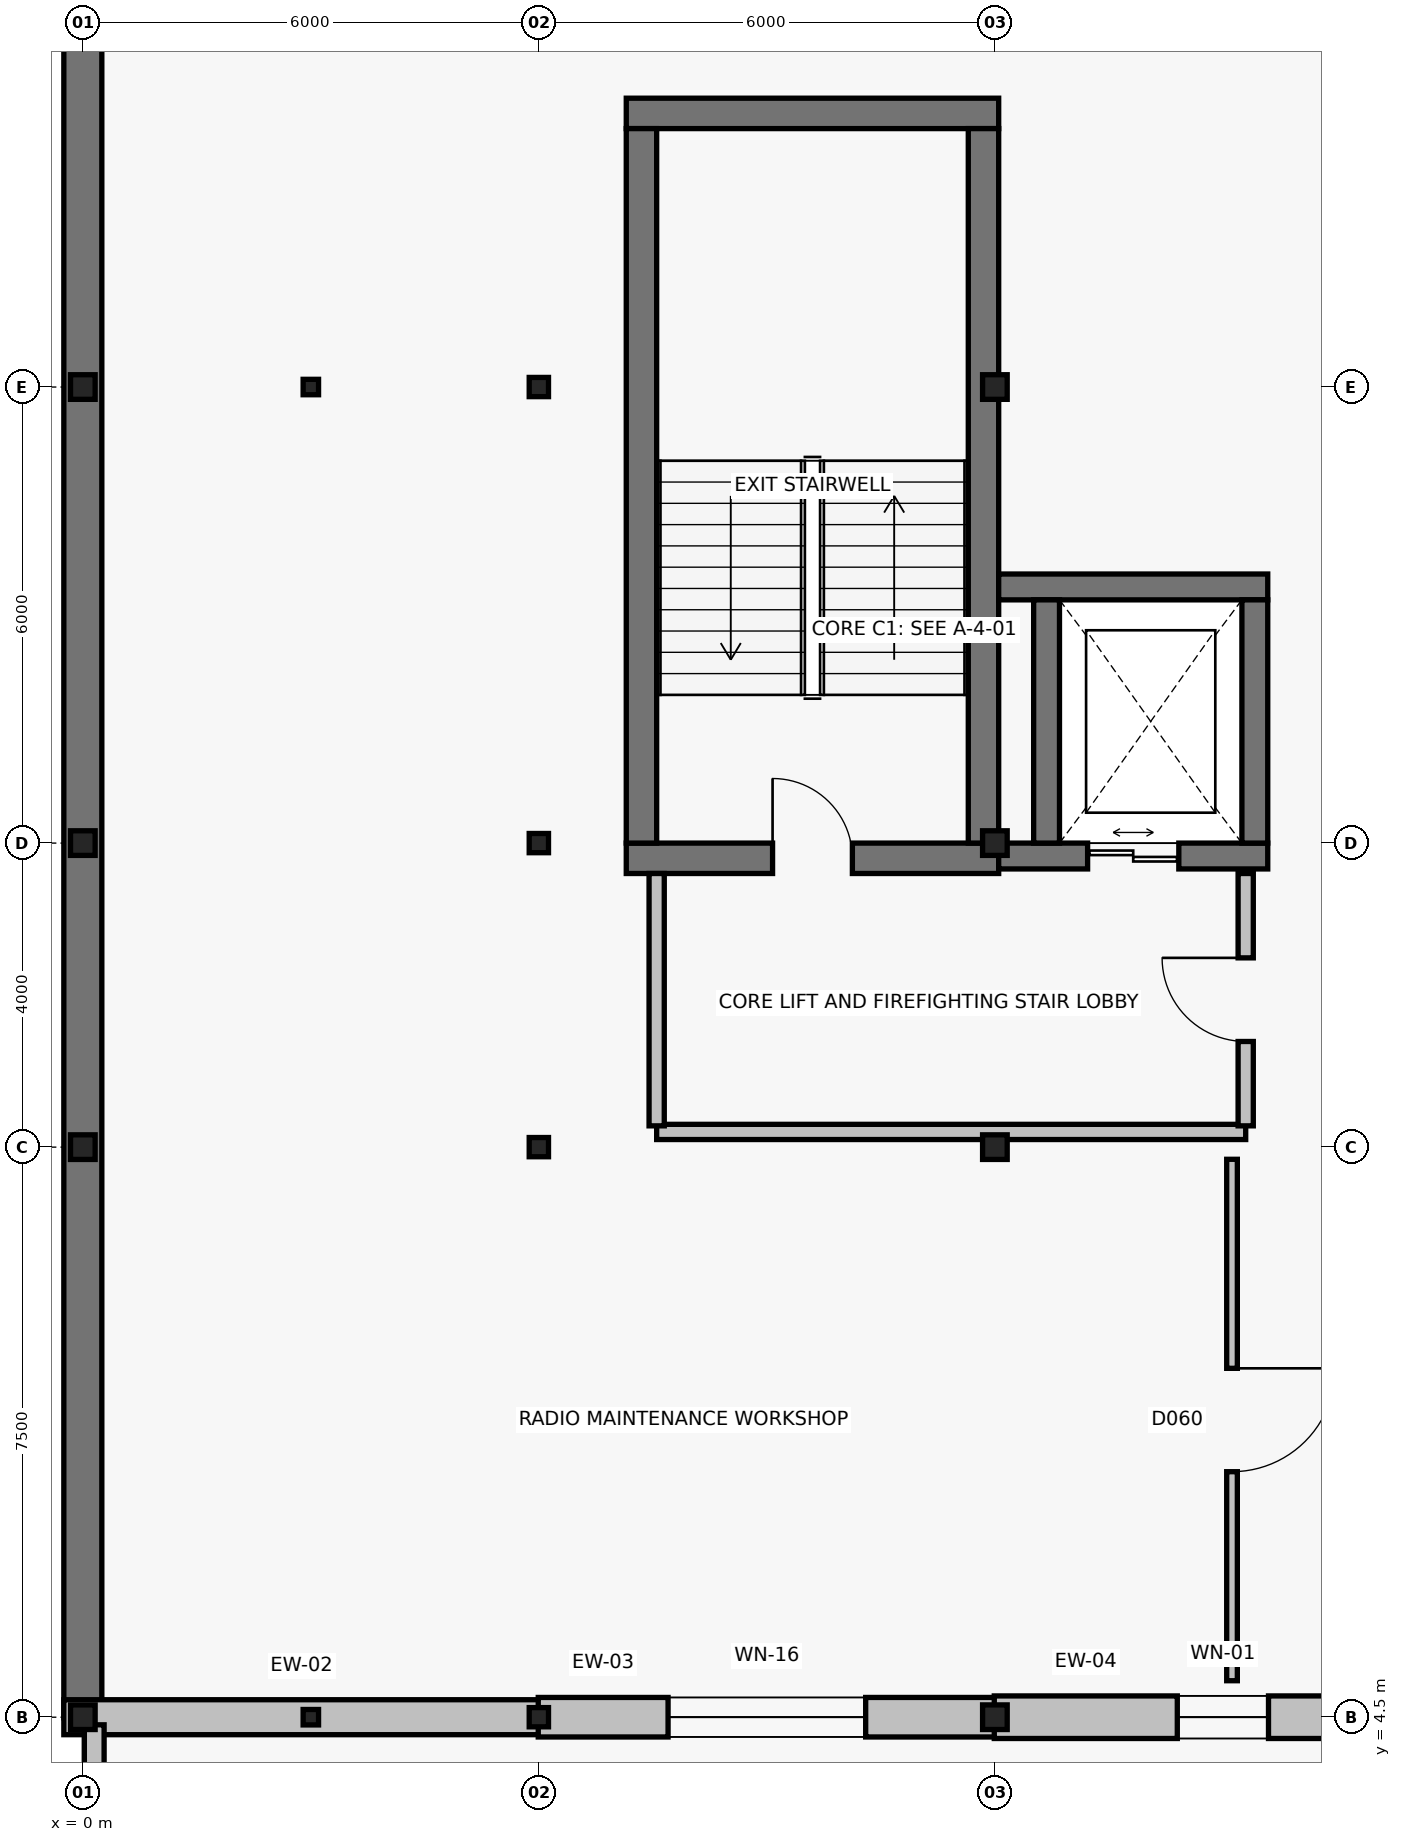
"""IFC4 building model, lengths in metres.
Left out: names, types, materials, properties, quantities, classifications, styles, units other than length and angle.
Written with IfcOpenShell. Run it as: python <this file> out.ifc"""

import sys

from ifc_helpers import new_model, si_unit, direction, frame, frame_2d, origin, origin_2d, place, context, subcontext, project, spatial, rectangle, hollow_rectangle, hollow_circle, i_section, extrude, element, fill, save


model = new_model("IFC4")
c1 = context("Model", 3, precision=1e-05, world=origin(), true_north=direction((0.0, 1.0)))
c2 = subcontext(c1, "Body", "Model", "MODEL_VIEW")
j1 = project(units=[si_unit("LENGTHUNIT", "METRE"), si_unit("PLANEANGLEUNIT", "RADIAN")], contexts=[c1])
p1 = place(None, origin())
s1 = spatial("IfcSite", under=j1, at=p1, CompositionType="ELEMENT")
p2 = place(p1, origin())
s2 = spatial("IfcBuilding", under=s1, at=p2, CompositionType="ELEMENT")
p3 = place(p2, frame((0.0, 0.0, 19.4)))
s3 = spatial("IfcBuildingStorey", under=s2, at=p3, CompositionType="ELEMENT", Elevation=19.4)
for number, where, z_axis, x_axis in (
    (1, (0.0, 4.5, 0.0), (0.0, 0.0, 1.0), (1.0, 0.0, 0.0)),
    (2, (0.0, 12.0, 0.0), (0.0, 0.0, 1.0), (1.0, 0.0, 0.0)),
    (3, (0.0, 16.0, 0.0), (0.0, 0.0, 1.0), (1.0, 0.0, 0.0)),
    (4, (0.0, 22.0, 0.0), (0.0, 0.0, 1.0), (1.0, 0.0, 0.0)),
):
    element("IfcColumn", number, at=place(p3, frame(where, z_axis=z_axis, x_axis=x_axis)), inside=s3, PredefinedType="COLUMN", context=c2, shape_type="SweptSolid", body=[
        extrude(hollow_circle(Radius=0.162, WallThickness=0.013, at=origin_2d()), origin(), (0.0, 0.0, 1.0), 4.2),
    ])
for number, where, z_axis, x_axis in (
    (5, (3.0, 4.5, 0.0), (0.0, 0.0, 1.0), (1.0, 0.0, 0.0)),
    (6, (3.0, 22.0, 0.0), (0.0, 0.0, 1.0), (1.0, 0.0, 0.0)),
):
    element("IfcColumn", number, at=place(p3, frame(where, z_axis=z_axis, x_axis=x_axis)), inside=s3, PredefinedType="COLUMN", context=c2, shape_type="SweptSolid", body=[
        extrude(hollow_rectangle(XDim=0.203, YDim=0.203, WallThickness=0.01, InnerFilletRadius=0.01, OuterFilletRadius=0.019, at=origin_2d()), origin(), (0.0, 0.0, 1.0), 4.2),
    ])
for number, where, z_axis, x_axis in (
    (7, (6.0, 4.5, 0.0), (0.0, 0.0, 1.0), (1.0, 0.0, 0.0)),
    (8, (6.0, 12.0, 0.0), (0.0, 0.0, 1.0), (1.0, 0.0, 0.0)),
    (9, (6.0, 16.0, 0.0), (0.0, 0.0, 1.0), (1.0, 0.0, 0.0)),
    (10, (6.0, 22.0, 0.0), (0.0, 0.0, 1.0), (1.0, 0.0, 0.0)),
):
    element("IfcColumn", number, at=place(p3, frame(where, z_axis=z_axis, x_axis=x_axis)), inside=s3, PredefinedType="COLUMN", context=c2, shape_type="SweptSolid", body=[
        extrude(i_section(OverallWidth=0.254, OverallDepth=0.253, WebThickness=0.009, FlangeThickness=0.014, FilletRadius=0.012, at=origin_2d()), origin(), (0.0, 0.0, 1.0), 4.2),
    ])
for number, where, z_axis, x_axis in (
    (11, (12.0, 4.5, 0.0), (0.0, 0.0, 1.0), (1.0, 0.0, 0.0)),
    (12, (12.0, 12.0, 0.0), (0.0, 0.0, 1.0), (1.0, 0.0, 0.0)),
    (13, (12.0, 16.0, 0.0), (0.0, 0.0, 1.0), (1.0, 0.0, 0.0)),
    (14, (12.0, 22.0, 0.0), (0.0, 0.0, 1.0), (1.0, 0.0, 0.0)),
):
    element("IfcColumn", number, at=place(p3, frame(where, z_axis=z_axis, x_axis=x_axis)), inside=s3, PredefinedType="COLUMN", context=c2, shape_type="SweptSolid", body=[
        extrude(hollow_circle(Radius=0.162, WallThickness=0.013, at=origin_2d()), origin(), (0.0, 0.0, 1.0), 4.2),
    ])
p4 = place(p3, frame((0.0, 4.492, 0.0), z_axis=(0.0, 0.0, 1.0), x_axis=(0.0, 1.0, 0.0)))
e15 = element("IfcWall", 15, at=p4, inside=s3, PredefinedType="SOLIDWALL", context=c2, shape_type="SweptSolid", body=[
    extrude(rectangle(XDim=61.516, YDim=0.5, at=frame_2d((30.758, 0.0))), origin(), (0.0, 0.0, 1.0), 3.88),
])
p5 = place(p3, frame((-0.25, 4.5, 0.0), z_axis=(0.0, 0.0, 1.0), x_axis=(1.0, 0.0, 0.0)))
e16 = element("IfcWall", 16, at=p5, inside=s3, PredefinedType="SOLIDWALL", context=c2, shape_type="SweptSolid", body=[
    extrude(rectangle(XDim=6.258, YDim=0.46, at=frame_2d((3.129, 0.0))), origin(), (0.0, 0.0, 1.0), 3.387),
])
p6 = place(p3, frame((5.992, 4.5, 0.0), z_axis=(0.0, 0.0, 1.0), x_axis=(1.0, 0.0, 0.0)))
e17 = element("IfcWall", 17, at=p6, inside=s3, PredefinedType="SOLIDWALL", context=c2, shape_type="SweptSolid", body=[
    extrude(rectangle(XDim=6.016, YDim=0.52, at=frame_2d((3.008, 0.0))), origin(), (0.0, 0.0, 1.0), 3.387),
])
p7 = place(p6, frame((1.708, 0.0, 0.9)))
e18 = element("IfcOpeningElement", 18, at=p7, cuts=e17, PredefinedType="OPENING", context=c2, shape_type="SweptSolid", body=[
    extrude(rectangle(XDim=2.6, YDim=2.1, at=frame_2d((1.3, 1.05))), frame((0.0, 0.275, 0.0), z_axis=(0.0, -1.0, 0.0), x_axis=(1.0, 0.0, 0.0)), (0.0, 0.0, 1.0), 0.55),
])
p8 = place(p3, frame((11.992, 4.5, 0.0), z_axis=(0.0, 0.0, 1.0), x_axis=(1.0, 0.0, 0.0)))
e19 = element("IfcWall", 19, at=p8, inside=s3, PredefinedType="SOLIDWALL", context=c2, shape_type="SweptSolid", body=[
    extrude(rectangle(XDim=6.016, YDim=0.56, at=frame_2d((3.008, 0.0))), origin(), (0.0, 0.0, 1.0), 3.387),
])
p9 = place(p8, frame((2.408, 0.0, 0.9)))
e20 = element("IfcOpeningElement", 20, at=p9, cuts=e19, PredefinedType="OPENING", context=c2, shape_type="SweptSolid", body=[
    extrude(rectangle(XDim=1.2, YDim=1.8, at=frame_2d((0.6, 0.9))), frame((0.0, 0.295, 0.0), z_axis=(0.0, -1.0, 0.0), x_axis=(1.0, 0.0, 0.0)), (0.0, 0.0, 1.0), 0.59),
])
p10 = place(p3, frame((0.15, 0.15, 0.0), z_axis=(0.0, 0.0, 1.0), x_axis=(0.0, 1.0, 0.0)))
e21 = element("IfcWall", 21, at=p10, inside=s3, PredefinedType="PARAPET", context=c2, shape_type="SweptSolid", body=[
    extrude(rectangle(XDim=4.25, YDim=0.26, at=frame_2d((2.125, 0.0))), origin(), (0.0, 0.0, 1.0), 1.15),
])
p11 = place(p3, frame((7.15, 15.8, 0.0), z_axis=(0.0, 0.0, 1.0), x_axis=(1.0, 0.0, 0.0)))
e22 = element("IfcWall", 22, at=p11, inside=s3, PredefinedType="SHEAR", context=c2, shape_type="SweptSolid", body=[
    extrude(rectangle(XDim=4.9, YDim=0.4, at=frame_2d((2.45, 0.0))), origin(), (0.0, 0.0, 1.0), 3.95),
])
p12 = place(p11, frame((1.925, 0.0, 0.0)))
e23 = element("IfcOpeningElement", 23, at=p12, cuts=e22, PredefinedType="OPENING", context=c2, shape_type="SweptSolid", body=[
    extrude(rectangle(XDim=1.05, YDim=2.15, at=frame_2d((0.525, 1.075))), frame((0.0, 0.215, 0.0), z_axis=(0.0, -1.0, 0.0), x_axis=(1.0, 0.0, 0.0)), (0.0, 0.0, 1.0), 0.43),
])
p13 = place(p3, frame((12.05, 25.6, 0.0), z_axis=(0.0, 0.0, 1.0), x_axis=(-1.0, 0.0, 0.0)))
e24 = element("IfcWall", 24, at=p13, inside=s3, PredefinedType="SHEAR", context=c2, shape_type="SweptSolid", body=[
    extrude(rectangle(XDim=4.9, YDim=0.4, at=frame_2d((2.45, 0.0))), origin(), (0.0, 0.0, 1.0), 3.95),
])
for number, where, z_axis, x_axis in (
    (25, (7.35, 25.4, 0.0), (0.0, 0.0, 1.0), (0.0, -1.0, 0.0)),
    (26, (11.85, 16.0, 0.0), (0.0, 0.0, 1.0), (0.0, 1.0, 0.0)),
):
    element("IfcWall", number, at=place(p3, frame(where, z_axis=z_axis, x_axis=x_axis)), inside=s3, PredefinedType="SHEAR", context=c2, shape_type="SweptSolid", body=[
        extrude(rectangle(XDim=9.4, YDim=0.4, at=frame_2d((4.7, 0.0))), origin(), (0.0, 0.0, 1.0), 3.95),
    ])
p14 = place(p3, frame((12.05, 15.83, 0.0), z_axis=(0.0, 0.0, 1.0), x_axis=(1.0, 0.0, 0.0)))
e27 = element("IfcWall", 27, at=p14, inside=s3, PredefinedType="SHEAR", context=c2, shape_type="SweptSolid", body=[
    extrude(rectangle(XDim=3.54, YDim=0.34, at=frame_2d((1.77, 0.0))), origin(), (0.0, 0.0, 1.0), 3.95),
])
p15 = place(p14, frame((1.17, 0.0, 0.0)))
e28 = element("IfcOpeningElement", 28, at=p15, cuts=e27, PredefinedType="OPENING", context=c2, shape_type="SweptSolid", body=[
    extrude(rectangle(XDim=1.2, YDim=2.2, at=frame_2d((0.6, 1.1))), frame((0.0, 0.185, 0.0), z_axis=(0.0, -1.0, 0.0), x_axis=(1.0, 0.0, 0.0)), (0.0, 0.0, 1.0), 0.37),
])
p16 = place(p3, frame((15.59, 19.37, 0.0), z_axis=(0.0, 0.0, 1.0), x_axis=(-1.0, 0.0, 0.0)))
e29 = element("IfcWall", 29, at=p16, inside=s3, PredefinedType="SHEAR", context=c2, shape_type="SweptSolid", body=[
    extrude(rectangle(XDim=3.54, YDim=0.34, at=frame_2d((1.77, 0.0))), origin(), (0.0, 0.0, 1.0), 3.95),
])
for number, where, z_axis, x_axis in (
    (30, (12.68, 19.2, 0.0), (0.0, 0.0, 1.0), (0.0, -1.0, 0.0)),
    (31, (15.42, 16.0, 0.0), (0.0, 0.0, 1.0), (0.0, 1.0, 0.0)),
):
    element("IfcWall", number, at=place(p3, frame(where, z_axis=z_axis, x_axis=x_axis)), inside=s3, PredefinedType="SHEAR", context=c2, shape_type="SweptSolid", body=[
        extrude(rectangle(XDim=3.2, YDim=0.34, at=frame_2d((1.6, 0.0))), origin(), (0.0, 0.0, 1.0), 3.95),
    ])
p17 = place(p3, frame((7.55, 12.2, 0.0), z_axis=(0.0, 0.0, 1.0), x_axis=(1.0, 0.0, 0.0)))
e32 = element("IfcWall", 32, at=p17, inside=s3, PredefinedType="PARTITIONING", context=c2, shape_type="SweptSolid", body=[
    extrude(rectangle(XDim=7.75, YDim=0.2, at=frame_2d((3.875, 0.0))), origin(), (0.0, 0.0, 1.0), 3.311),
])
p18 = place(p3, frame((7.55, 15.6, 0.0), z_axis=(0.0, 0.0, 1.0), x_axis=(0.0, -1.0, 0.0)))
e33 = element("IfcWall", 33, at=p18, inside=s3, PredefinedType="PARTITIONING", context=c2, shape_type="SweptSolid", body=[
    extrude(rectangle(XDim=3.32, YDim=0.2, at=frame_2d((1.66, 0.0))), origin(), (0.0, 0.0, 1.0), 3.311),
])
p19 = place(p3, frame((15.3, 12.28, 0.0), z_axis=(0.0, 0.0, 1.0), x_axis=(0.0, 1.0, 0.0)))
e34 = element("IfcWall", 34, at=p19, inside=s3, PredefinedType="PARTITIONING", context=c2, shape_type="SweptSolid", body=[
    extrude(rectangle(XDim=3.32, YDim=0.2, at=frame_2d((1.66, 0.0))), origin(), (0.0, 0.0, 1.0), 3.387),
])
p20 = place(p19, frame((1.11, 0.0, 0.0)))
e35 = element("IfcOpeningElement", 35, at=p20, cuts=e34, PredefinedType="OPENING", context=c2, shape_type="SweptSolid", body=[
    extrude(rectangle(XDim=1.1, YDim=2.15, at=frame_2d((0.55, 1.075))), frame((0.0, 0.115, 0.0), z_axis=(0.0, -1.0, 0.0), x_axis=(1.0, 0.0, 0.0)), (0.0, 0.0, 1.0), 0.23),
])
p21 = place(p3, frame((15.12, 11.84, 0.0), z_axis=(0.0, 0.0, 1.0), x_axis=(0.0, -1.0, 0.0)))
e36 = element("IfcWall", 36, at=p21, inside=s3, PredefinedType="PARTITIONING", context=c2, shape_type="SweptSolid", body=[
    extrude(rectangle(XDim=6.86, YDim=0.14, at=frame_2d((3.43, 0.0))), origin(), (0.0, 0.0, 1.0), 3.387),
])
p22 = place(p21, frame((2.75, 0.0, 0.0)))
e37 = element("IfcOpeningElement", 37, at=p22, cuts=e36, PredefinedType="OPENING", context=c2, shape_type="SweptSolid", body=[
    extrude(rectangle(XDim=1.36, YDim=2.2, at=frame_2d((0.68, 1.1))), frame((0.0, 0.085, 0.0), z_axis=(0.0, -1.0, 0.0), x_axis=(1.0, 0.0, 0.0)), (0.0, 0.0, 1.0), 0.17),
])
p23 = place(p7, origin())
e38 = element("IfcWindow", 38, at=p23, inside=s3, PartitioningType="SINGLE_PANEL", PredefinedType="WINDOW", context=c2, shape_type="SweptSolid", body=[
    extrude(rectangle(XDim=2.6, YDim=2.1, at=frame_2d((1.3, 1.05))), frame((0.0, 0.03, 0.0), z_axis=(0.0, -1.0, 0.0), x_axis=(1.0, 0.0, 0.0)), (0.0, 0.0, 1.0), 0.06),
])
fill(e18, e38)
p24 = place(p9, origin())
e39 = element("IfcWindow", 39, at=p24, inside=s3, PartitioningType="SINGLE_PANEL", PredefinedType="WINDOW", context=c2, shape_type="SweptSolid", body=[
    extrude(rectangle(XDim=1.2, YDim=1.8, at=frame_2d((0.6, 0.9))), frame((0.0, 0.03, 0.0), z_axis=(0.0, -1.0, 0.0), x_axis=(1.0, 0.0, 0.0)), (0.0, 0.0, 1.0), 0.06),
])
fill(e20, e39)
p25 = place(p12, origin())
e40 = element("IfcDoor", 40, at=p25, inside=s3, OperationType="SINGLE_SWING_LEFT", PredefinedType="DOOR", context=c2, shape_type="SweptSolid", body=[
    extrude(rectangle(XDim=1.05, YDim=2.15, at=frame_2d((0.525, 1.075))), frame((0.0, 0.025, 0.0), z_axis=(0.0, -1.0, 0.0), x_axis=(1.0, 0.0, 0.0)), (0.0, 0.0, 1.0), 0.05),
])
fill(e23, e40)
p26 = place(p15, origin())
e41 = element("IfcDoor", 41, at=p26, inside=s3, OperationType="DOUBLE_DOOR_SLIDING", PredefinedType="DOOR", context=c2, shape_type="SweptSolid", body=[
    extrude(rectangle(XDim=1.2, YDim=2.2, at=frame_2d((0.6, 1.1))), frame((0.0, 0.025, 0.0), z_axis=(0.0, -1.0, 0.0), x_axis=(1.0, 0.0, 0.0)), (0.0, 0.0, 1.0), 0.05),
])
fill(e28, e41)
p27 = place(p20, origin())
e42 = element("IfcDoor", 42, at=p27, inside=s3, OperationType="SINGLE_SWING_RIGHT", PredefinedType="DOOR", context=c2, shape_type="SweptSolid", body=[
    extrude(rectangle(XDim=1.1, YDim=2.15, at=frame_2d((0.55, 1.075))), frame((0.0, 0.025, 0.0), z_axis=(0.0, -1.0, 0.0), x_axis=(1.0, 0.0, 0.0)), (0.0, 0.0, 1.0), 0.05),
])
fill(e35, e42)
p28 = place(p22, origin())
e43 = element("IfcDoor", 43, at=p28, inside=s3, OperationType="SINGLE_SWING_LEFT", PredefinedType="DOOR", context=c2, shape_type="SweptSolid", body=[
    extrude(rectangle(XDim=1.36, YDim=2.2, at=frame_2d((0.68, 1.1))), frame((0.0, 0.025, 0.0), z_axis=(0.0, -1.0, 0.0), x_axis=(1.0, 0.0, 0.0)), (0.0, 0.0, 1.0), 0.05),
])
fill(e37, e43)
save(model, sys.argv[1])
